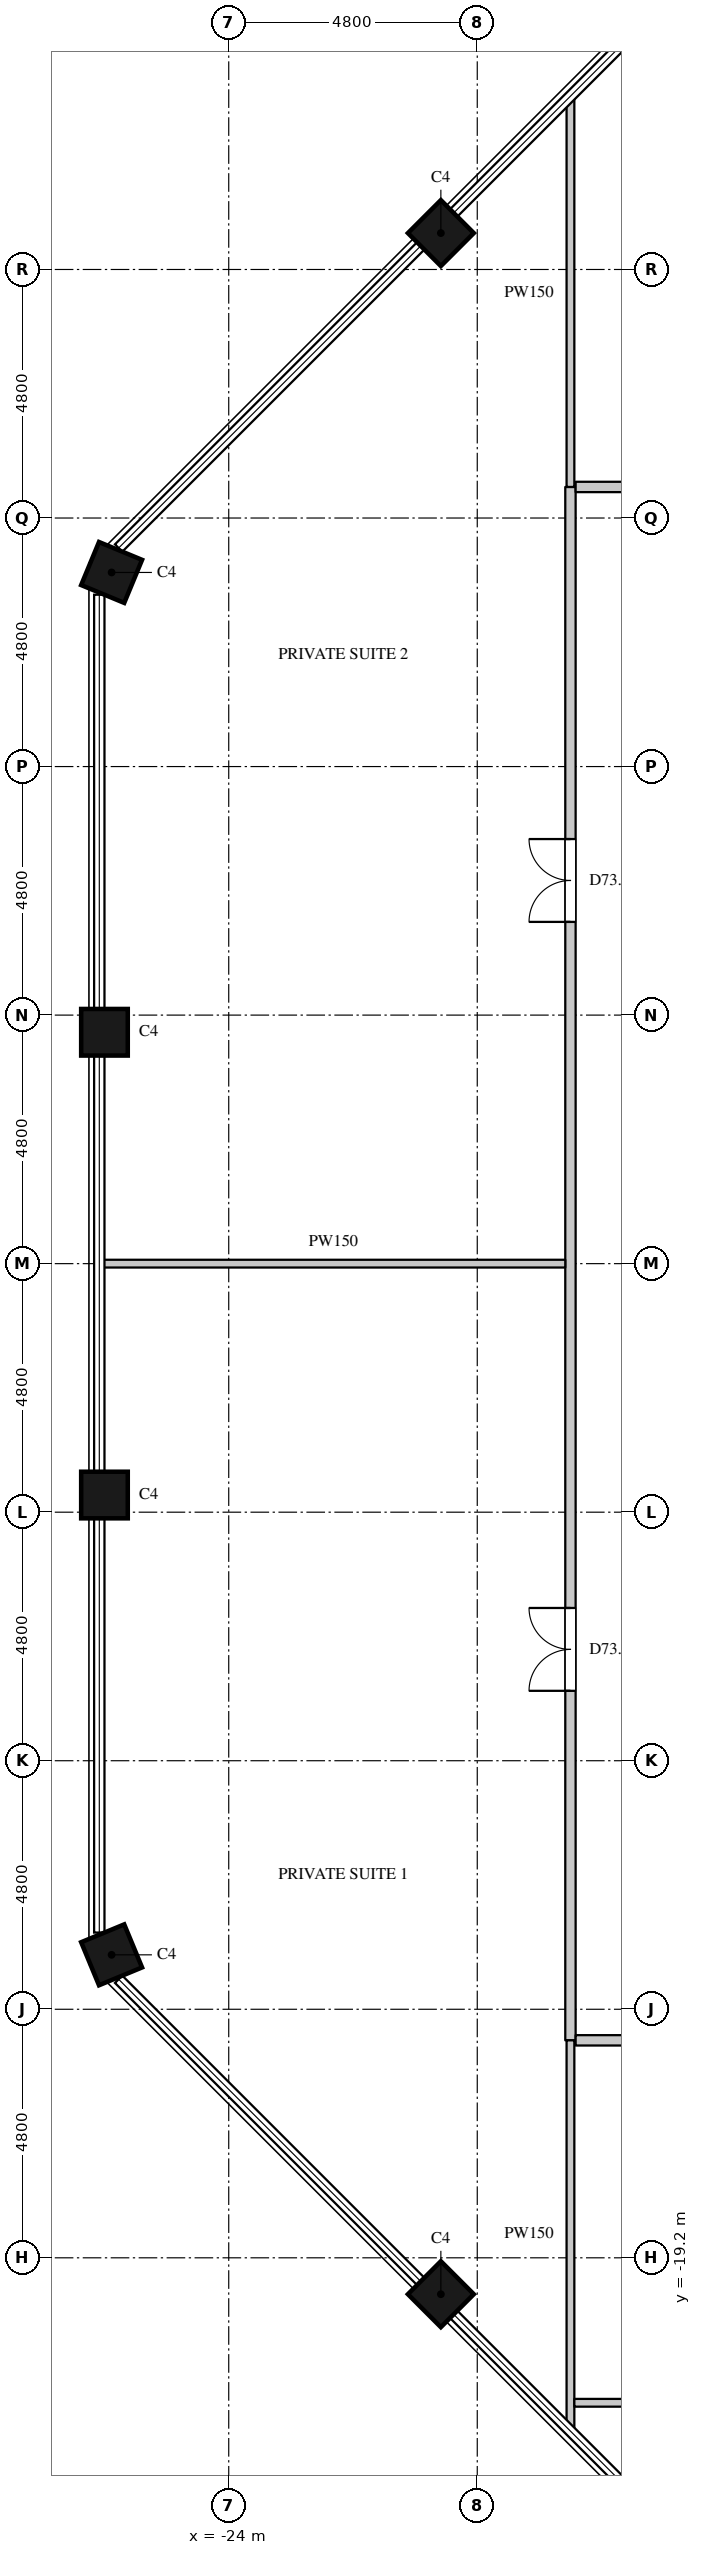
"""IFC4 building model, lengths in metres.
Left out: names, types, materials, properties, quantities, classifications, styles, units other than length and angle.
Written with IfcOpenShell. Run it as: python <this file> out.ifc"""

import sys

from ifc_helpers import new_model, si_unit, direction, frame, frame_2d, origin, origin_2d, place, context, subcontext, project, spatial, rectangle, extrude, element, fill, save


model = new_model("IFC4")
c1 = context("Model", 3, precision=1e-05, world=origin(), true_north=direction((0.0, 1.0)))
c2 = subcontext(c1, "Body", "Model", "MODEL_VIEW")
j1 = project(units=[si_unit("LENGTHUNIT", "METRE"), si_unit("PLANEANGLEUNIT", "RADIAN")], contexts=[c1])
p1 = place(None, origin())
s1 = spatial("IfcSite", under=j1, at=p1, CompositionType="ELEMENT")
p2 = place(p1, origin())
s2 = spatial("IfcBuilding", under=s1, at=p2, CompositionType="ELEMENT")
p3 = place(p2, frame((0.0, 0.0, 314.7)))
s3 = spatial("IfcBuildingStorey", under=s2, at=p3, CompositionType="ELEMENT", Elevation=314.7)
for number, where, z_axis, x_axis in (
    (1, (-19.903, 19.903, 0.0), (0.0, 0.0, 1.0), (-0.707, -0.707, 0.0)),
    (2, (-26.262, 13.349, 0.0), (0.0, 0.0, 1.0), (-0.383, -0.924, 0.0)),
    (3, (-26.4, 4.469, 0.0), (0.0, 0.0, 1.0), (0.0, -1.0, 0.0)),
    (4, (-26.4, -4.469, 0.0), (0.0, 0.0, 1.0), (0.0, -1.0, 0.0)),
    (5, (-26.262, -13.349, 0.0), (0.0, 0.0, 1.0), (0.383, -0.924, 0.0)),
    (6, (-19.903, -19.903, 0.0), (0.0, 0.0, 1.0), (0.707, -0.707, 0.0)),
):
    element("IfcColumn", number, at=place(p3, frame(where, z_axis=z_axis, x_axis=x_axis)), inside=s3, PredefinedType="COLUMN", context=c2, shape_type="SweptSolid", body=[
        extrude(rectangle(XDim=0.9, YDim=0.9, at=origin_2d()), origin(), (0.0, 0.0, 1.0), 5.4),
    ])
p4 = place(p3, frame((-17.4, -15.0, 0.0), z_axis=(0.0, 0.0, 1.0), x_axis=(0.0, 1.0, 0.0)))
e7 = element("IfcWall", 7, at=p4, inside=s3, PredefinedType="PARTITIONING", context=c2, shape_type="SweptSolid", body=[
    extrude(rectangle(XDim=30.0, YDim=0.2, at=frame_2d((15.0, 0.0))), origin(), (0.0, 0.0, 1.0), 5.1),
])
p5 = place(p4, frame((6.75, 0.0, 0.0)))
e8 = element("IfcOpeningElement", 8, at=p5, cuts=e7, PredefinedType="OPENING", context=c2, shape_type="SweptSolid", body=[
    extrude(rectangle(XDim=1.6, YDim=2.4, at=frame_2d((0.8, 1.2))), frame((0.0, 0.11, 0.0), z_axis=(0.0, -1.0, 0.0), x_axis=(1.0, 0.0, 0.0)), (0.0, 0.0, 1.0), 0.22),
])
p6 = place(p4, frame((21.6, 0.0, 0.0)))
e9 = element("IfcOpeningElement", 9, at=p6, cuts=e7, PredefinedType="OPENING", context=c2, shape_type="SweptSolid", body=[
    extrude(rectangle(XDim=1.6, YDim=2.4, at=frame_2d((0.8, 1.2))), frame((0.0, 0.11, 0.0), z_axis=(0.0, -1.0, 0.0), x_axis=(1.0, 0.0, 0.0)), (0.0, 0.0, 1.0), 0.22),
])
p7 = place(p3, frame((-17.3, -15.0, 0.0), z_axis=(0.0, 0.0, 1.0), x_axis=(1.0, 0.0, 0.0)))
e10 = element("IfcWall", 10, at=p7, inside=s3, PredefinedType="PARTITIONING", context=c2, shape_type="SweptSolid", body=[
    extrude(rectangle(XDim=34.6, YDim=0.2, at=frame_2d((17.3, 0.0))), origin(), (0.0, 0.0, 1.0), 5.1),
])
p8 = place(p7, frame((3.75, 0.0, 0.0)))
e11 = element("IfcOpeningElement", 11, at=p8, cuts=e10, PredefinedType="OPENING", context=c2, shape_type="SweptSolid", body=[
    extrude(rectangle(XDim=0.9, YDim=2.2, at=frame_2d((0.45, 1.1))), frame((0.0, 0.11, 0.0), z_axis=(0.0, -1.0, 0.0), x_axis=(1.0, 0.0, 0.0)), (0.0, 0.0, 1.0), 0.22),
])
p9 = place(p7, frame((10.3, 0.0, 0.0)))
e12 = element("IfcOpeningElement", 12, at=p9, cuts=e10, PredefinedType="OPENING", context=c2, shape_type="SweptSolid", body=[
    extrude(rectangle(XDim=0.9, YDim=2.2, at=frame_2d((0.45, 1.1))), frame((0.0, 0.11, 0.0), z_axis=(0.0, -1.0, 0.0), x_axis=(1.0, 0.0, 0.0)), (0.0, 0.0, 1.0), 0.22),
])
p10 = place(p7, frame((14.6, 0.0, 0.0)))
e13 = element("IfcOpeningElement", 13, at=p10, cuts=e10, PredefinedType="OPENING", context=c2, shape_type="SweptSolid", body=[
    extrude(rectangle(XDim=0.9, YDim=2.2, at=frame_2d((0.45, 1.1))), frame((0.0, 0.11, 0.0), z_axis=(0.0, -1.0, 0.0), x_axis=(1.0, 0.0, 0.0)), (0.0, 0.0, 1.0), 0.22),
])
p11 = place(p7, frame((20.75, 0.0, 0.0)))
e14 = element("IfcOpeningElement", 14, at=p11, cuts=e10, PredefinedType="OPENING", context=c2, shape_type="SweptSolid", body=[
    extrude(rectangle(XDim=1.6, YDim=2.4, at=frame_2d((0.8, 1.2))), frame((0.0, 0.11, 0.0), z_axis=(0.0, -1.0, 0.0), x_axis=(1.0, 0.0, 0.0)), (0.0, 0.0, 1.0), 0.22),
])
p12 = place(p7, frame((29.6, 0.0, 0.0)))
e15 = element("IfcOpeningElement", 15, at=p12, cuts=e10, PredefinedType="OPENING", context=c2, shape_type="SweptSolid", body=[
    extrude(rectangle(XDim=1.6, YDim=2.4, at=frame_2d((0.8, 1.2))), frame((0.0, 0.11, 0.0), z_axis=(0.0, -1.0, 0.0), x_axis=(1.0, 0.0, 0.0)), (0.0, 0.0, 1.0), 0.22),
])
p13 = place(p3, frame((-17.3, 15.0, 0.0), z_axis=(0.0, 0.0, 1.0), x_axis=(1.0, 0.0, 0.0)))
e16 = element("IfcWall", 16, at=p13, inside=s3, PredefinedType="PARTITIONING", context=c2, shape_type="SweptSolid", body=[
    extrude(rectangle(XDim=34.625, YDim=0.2, at=frame_2d((17.312, 0.0))), origin(), (0.0, 0.0, 1.0), 5.1),
])
p14 = place(p13, frame((3.4, 0.0, 0.0)))
e17 = element("IfcOpeningElement", 17, at=p14, cuts=e16, PredefinedType="OPENING", context=c2, shape_type="SweptSolid", body=[
    extrude(rectangle(XDim=1.6, YDim=2.4, at=frame_2d((0.8, 1.2))), frame((0.0, 0.11, 0.0), z_axis=(0.0, -1.0, 0.0), x_axis=(1.0, 0.0, 0.0)), (0.0, 0.0, 1.0), 0.22),
])
p15 = place(p13, frame((29.6, 0.0, 0.0)))
e18 = element("IfcOpeningElement", 18, at=p15, cuts=e16, PredefinedType="OPENING", context=c2, shape_type="SweptSolid", body=[
    extrude(rectangle(XDim=1.6, YDim=2.4, at=frame_2d((0.8, 1.2))), frame((0.0, 0.11, 0.0), z_axis=(0.0, -1.0, 0.0), x_axis=(1.0, 0.0, 0.0)), (0.0, 0.0, 1.0), 0.22),
])
p16 = place(p13, frame((16.5, 0.0, 0.0)))
e19 = element("IfcOpeningElement", 19, at=p16, cuts=e16, PredefinedType="OPENING", context=c2, shape_type="SweptSolid", body=[
    extrude(rectangle(XDim=1.6, YDim=2.4, at=frame_2d((0.8, 1.2))), frame((0.0, 0.11, 0.0), z_axis=(0.0, -1.0, 0.0), x_axis=(1.0, 0.0, 0.0)), (0.0, 0.0, 1.0), 0.22),
])
p17 = place(p3, frame((-26.455, 0.0, 0.0), z_axis=(0.0, 0.0, 1.0), x_axis=(1.0, 0.0, 0.0)))
e20 = element("IfcWall", 20, at=p17, inside=s3, PredefinedType="PARTITIONING", context=c2, shape_type="SweptSolid", body=[
    extrude(rectangle(XDim=8.955, YDim=0.15, at=frame_2d((4.478, 0.0))), origin(), (0.0, 0.0, 1.0), 5.1),
])
p18 = place(p3, frame((-17.4, -22.484, 0.0), z_axis=(0.0, 0.0, 1.0), x_axis=(0.0, 1.0, 0.0)))
e21 = element("IfcWall", 21, at=p18, inside=s3, PredefinedType="PARTITIONING", context=c2, shape_type="SweptSolid", body=[
    extrude(rectangle(XDim=7.484, YDim=0.15, at=frame_2d((3.742, 0.0))), origin(), (0.0, 0.0, 1.0), 5.1),
])
p19 = place(p3, frame((-17.325, -22.0, 0.0), z_axis=(0.0, 0.0, 1.0), x_axis=(1.0, 0.0, 0.0)))
e22 = element("IfcWall", 22, at=p19, inside=s3, PredefinedType="PARTITIONING", context=c2, shape_type="SweptSolid", body=[
    extrude(rectangle(XDim=34.65, YDim=0.15, at=frame_2d((17.325, 0.0))), origin(), (0.0, 0.0, 1.0), 5.1),
])
p20 = place(p19, frame((21.15, 0.0, 0.0)))
e23 = element("IfcOpeningElement", 23, at=p20, cuts=e22, PredefinedType="OPENING", context=c2, shape_type="SweptSolid", body=[
    extrude(rectangle(XDim=0.9, YDim=2.2, at=frame_2d((0.45, 1.1))), frame((0.0, 0.085, 0.0), z_axis=(0.0, -1.0, 0.0), x_axis=(1.0, 0.0, 0.0)), (0.0, 0.0, 1.0), 0.17),
])
p21 = place(p3, frame((-17.4, 15.0, 0.0), z_axis=(0.0, 0.0, 1.0), x_axis=(0.0, 1.0, 0.0)))
e24 = element("IfcWall", 24, at=p21, inside=s3, PredefinedType="PARTITIONING", context=c2, shape_type="SweptSolid", body=[
    extrude(rectangle(XDim=7.484, YDim=0.15, at=frame_2d((3.742, 0.0))), origin(), (0.0, 0.0, 1.0), 5.1),
])
p22 = place(p5, origin())
e25 = element("IfcDoor", 25, at=p22, inside=s3, OperationType="DOUBLE_DOOR_SINGLE_SWING", PredefinedType="DOOR", context=c2, shape_type="SweptSolid", body=[
    extrude(rectangle(XDim=1.6, YDim=2.4, at=frame_2d((0.8, 1.2))), frame((0.0, 0.025, 0.0), z_axis=(0.0, -1.0, 0.0), x_axis=(1.0, 0.0, 0.0)), (0.0, 0.0, 1.0), 0.05),
])
fill(e8, e25)
p23 = place(p6, origin())
e26 = element("IfcDoor", 26, at=p23, inside=s3, OperationType="DOUBLE_DOOR_SINGLE_SWING", PredefinedType="DOOR", context=c2, shape_type="SweptSolid", body=[
    extrude(rectangle(XDim=1.6, YDim=2.4, at=frame_2d((0.8, 1.2))), frame((0.0, 0.025, 0.0), z_axis=(0.0, -1.0, 0.0), x_axis=(1.0, 0.0, 0.0)), (0.0, 0.0, 1.0), 0.05),
])
fill(e9, e26)
save(model, sys.argv[1])
